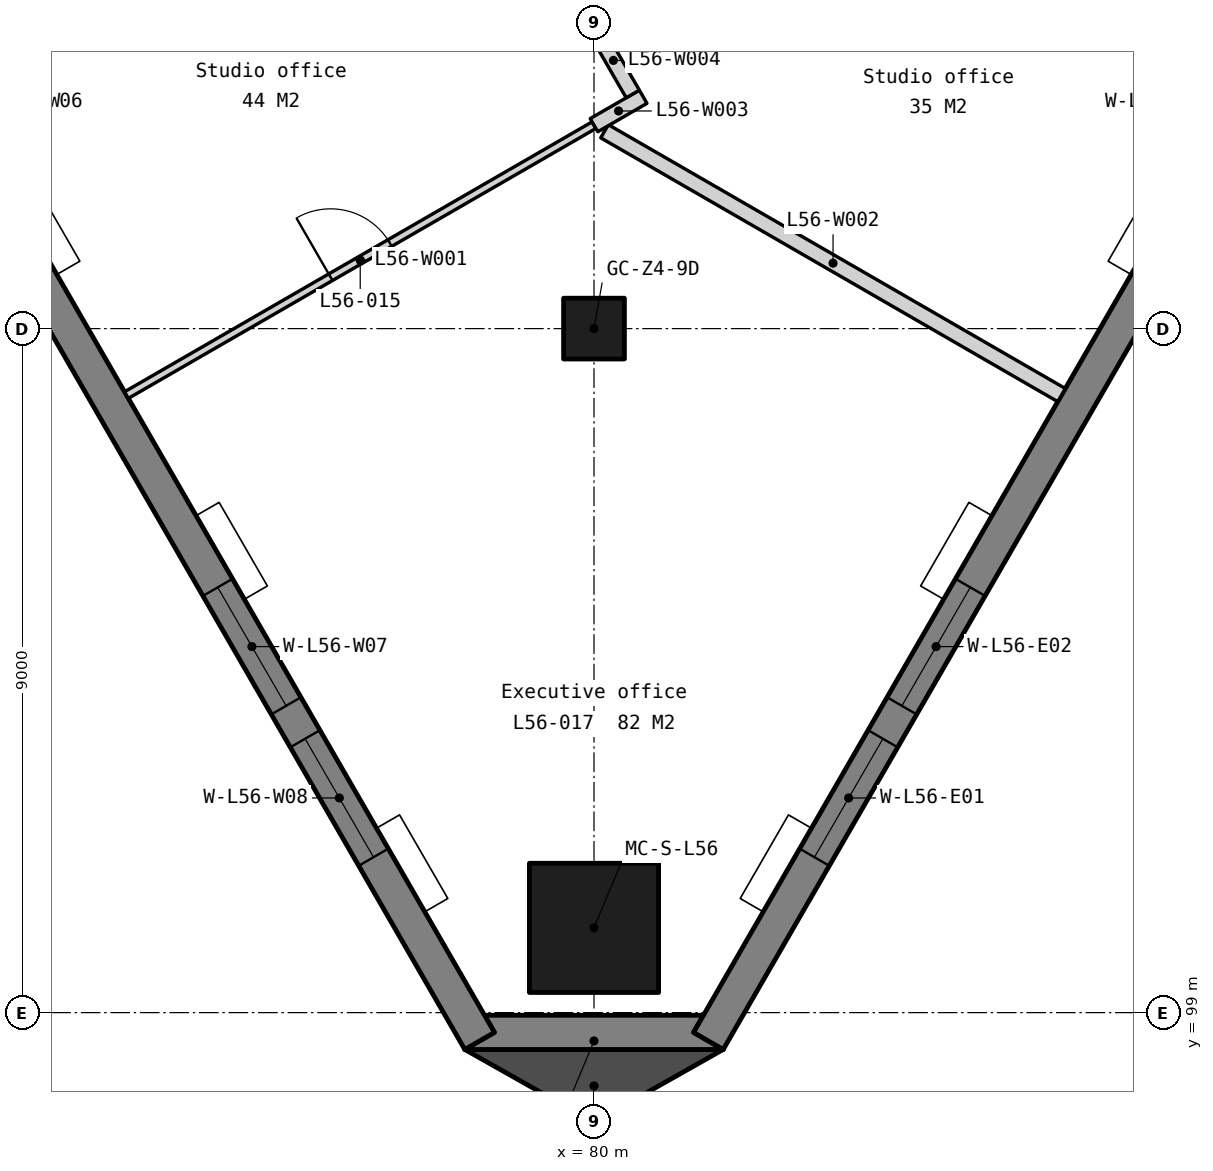
"""IFC4 building model, lengths in metres.
Left out: names, types, materials, properties, quantities, classifications, styles, units other than length and angle.
Written with IfcOpenShell. Run it as: python <this file> out.ifc"""

import sys

from ifc_helpers import new_model, si_unit, direction, frame, frame_2d, origin, origin_2d, place, context, subcontext, project, spatial, polyline, rectangle, outline, extrude, element, fill, save


model = new_model("IFC4")
c1 = context("Model", 3, precision=1e-05, world=origin(), true_north=direction((0.0, 1.0)))
c2 = subcontext(c1, "Body", "Model", "MODEL_VIEW")
j1 = project(units=[si_unit("LENGTHUNIT", "METRE"), si_unit("PLANEANGLEUNIT", "RADIAN")], contexts=[c1])
p1 = place(None, origin())
s1 = spatial("IfcSite", under=j1, at=p1, CompositionType="ELEMENT")
p2 = place(p1, origin())
s2 = spatial("IfcBuilding", under=s1, at=p2, CompositionType="ELEMENT")
p3 = place(p2, frame((0.0, 0.0, 223.1)))
s3 = spatial("IfcBuildingStorey", under=s2, at=p3, CompositionType="ELEMENT", Elevation=223.1)
p4 = place(p3, frame((80.0, 108.0, 0.0), z_axis=(0.0, 0.0, 1.0), x_axis=(1.0, 0.0, 0.0)))
e1 = element("IfcColumn", 1, at=p4, inside=s3, PredefinedType="COLUMN", context=c2, shape_type="SweptSolid", body=[
    extrude(rectangle(XDim=0.8, YDim=0.8, at=origin_2d()), origin(), (0.0, 0.0, 1.0), 3.9),
])
p5 = place(p3, frame((80.0, 100.115, 0.0), z_axis=(0.0, 0.0, 1.0), x_axis=(1.0, 0.0, 0.0)))
e2 = element("IfcColumn", 2, at=p5, inside=s3, PredefinedType="COLUMN", context=c2, shape_type="SweptSolid", body=[
    extrude(rectangle(XDim=1.7, YDim=1.7, at=origin_2d()), origin(), (0.0, 0.0, 1.0), 3.9),
])
p6 = place(p3, frame((0.0, 0.0, -0.15)))
e3 = element("IfcWall", 3, at=p6, inside=s3, PredefinedType="SOLIDWALL", context=c2, shape_type="SweptSolid", body=[
    extrude(outline(polyline([(78.3, 98.515), (78.69, 98.74), (78.56, 98.965), (81.44, 98.965), (81.31, 98.74), (81.7, 98.515), (78.3, 98.515)])), origin(), (0.0, 0.0, 1.0), 3.75),
])
p7 = place(p3, frame((59.13, 132.168, -0.15), z_axis=(0.0, 0.0, 1.0), x_axis=(0.500002199942, -0.866024133644, 0.0)))
e4 = element("IfcWall", 4, at=p7, inside=s3, PredefinedType="SOLIDWALL", context=c2, shape_type="SweptSolid", body=[
    extrude(outline(polyline([(38.729, 0.0), (38.729, 3.75), (0.0, 3.75), (0.0, 0.0), (38.729, 0.0)])), frame((0.0, 0.225, 0.0), z_axis=(0.0, -1.0, 0.0), x_axis=(1.0, 0.0, 0.0)), (0.0, 0.0, 1.0), 0.45),
])
p8 = place(p7, frame((2.791, 0.0, 0.95)))
e5 = element("IfcOpeningElement", 5, at=p8, cuts=e4, PredefinedType="OPENING", context=c2, shape_type="SweptSolid", body=[
    extrude(rectangle(XDim=1.8, YDim=2.2, at=frame_2d((0.9, 1.1))), frame((0.0, 0.235, 0.0), z_axis=(0.0, -1.0, 0.0), x_axis=(1.0, 0.0, 0.0)), (0.0, 0.0, 1.0), 0.47),
])
p9 = place(p7, frame((5.091, 0.0, 0.95)))
e6 = element("IfcOpeningElement", 6, at=p9, cuts=e4, PredefinedType="OPENING", context=c2, shape_type="SweptSolid", body=[
    extrude(rectangle(XDim=1.8, YDim=2.2, at=frame_2d((0.9, 1.1))), frame((0.0, 0.235, 0.0), z_axis=(0.0, -1.0, 0.0), x_axis=(1.0, 0.0, 0.0)), (0.0, 0.0, 1.0), 0.47),
])
p10 = place(p7, frame((12.473, 0.0, 0.95)))
e7 = element("IfcOpeningElement", 7, at=p10, cuts=e4, PredefinedType="OPENING", context=c2, shape_type="SweptSolid", body=[
    extrude(rectangle(XDim=1.8, YDim=2.2, at=frame_2d((0.9, 1.1))), frame((0.0, 0.235, 0.0), z_axis=(0.0, -1.0, 0.0), x_axis=(1.0, 0.0, 0.0)), (0.0, 0.0, 1.0), 0.47),
])
p11 = place(p7, frame((14.773, 0.0, 0.95)))
e8 = element("IfcOpeningElement", 8, at=p11, cuts=e4, PredefinedType="OPENING", context=c2, shape_type="SweptSolid", body=[
    extrude(rectangle(XDim=1.8, YDim=2.2, at=frame_2d((0.9, 1.1))), frame((0.0, 0.235, 0.0), z_axis=(0.0, -1.0, 0.0), x_axis=(1.0, 0.0, 0.0)), (0.0, 0.0, 1.0), 0.47),
])
p12 = place(p7, frame((22.156, 0.0, 0.95)))
e9 = element("IfcOpeningElement", 9, at=p12, cuts=e4, PredefinedType="OPENING", context=c2, shape_type="SweptSolid", body=[
    extrude(rectangle(XDim=1.8, YDim=2.2, at=frame_2d((0.9, 1.1))), frame((0.0, 0.235, 0.0), z_axis=(0.0, -1.0, 0.0), x_axis=(1.0, 0.0, 0.0)), (0.0, 0.0, 1.0), 0.47),
])
p13 = place(p7, frame((24.456, 0.0, 0.95)))
e10 = element("IfcOpeningElement", 10, at=p13, cuts=e4, PredefinedType="OPENING", context=c2, shape_type="SweptSolid", body=[
    extrude(rectangle(XDim=1.8, YDim=2.2, at=frame_2d((0.9, 1.1))), frame((0.0, 0.235, 0.0), z_axis=(0.0, -1.0, 0.0), x_axis=(1.0, 0.0, 0.0)), (0.0, 0.0, 1.0), 0.47),
])
p14 = place(p7, frame((31.838, 0.0, 0.95)))
e11 = element("IfcOpeningElement", 11, at=p14, cuts=e4, PredefinedType="OPENING", context=c2, shape_type="SweptSolid", body=[
    extrude(rectangle(XDim=1.8, YDim=2.2, at=frame_2d((0.9, 1.1))), frame((0.0, 0.235, 0.0), z_axis=(0.0, -1.0, 0.0), x_axis=(1.0, 0.0, 0.0)), (0.0, 0.0, 1.0), 0.47),
])
p15 = place(p7, frame((34.138, 0.0, 0.95)))
e12 = element("IfcOpeningElement", 12, at=p15, cuts=e4, PredefinedType="OPENING", context=c2, shape_type="SweptSolid", body=[
    extrude(rectangle(XDim=1.8, YDim=2.2, at=frame_2d((0.9, 1.1))), frame((0.0, 0.235, 0.0), z_axis=(0.0, -1.0, 0.0), x_axis=(1.0, 0.0, 0.0)), (0.0, 0.0, 1.0), 0.47),
])
p16 = place(p3, frame((81.505, 98.627, -0.15), z_axis=(0.0, 0.0, 1.0), x_axis=(0.500002199942, 0.866024133644, 0.0)))
e13 = element("IfcWall", 13, at=p16, inside=s3, PredefinedType="SOLIDWALL", context=c2, shape_type="SweptSolid", body=[
    extrude(outline(polyline([(38.729, 0.0), (38.729, 3.75), (0.0, 3.75), (0.0, 0.0), (38.729, 0.0)])), frame((0.0, 0.225, 0.0), z_axis=(0.0, -1.0, 0.0), x_axis=(1.0, 0.0, 0.0)), (0.0, 0.0, 1.0), 0.45),
])
p17 = place(p16, frame((2.791, 0.0, 0.95)))
e14 = element("IfcOpeningElement", 14, at=p17, cuts=e13, PredefinedType="OPENING", context=c2, shape_type="SweptSolid", body=[
    extrude(rectangle(XDim=1.8, YDim=2.2, at=frame_2d((0.9, 1.1))), frame((0.0, 0.235, 0.0), z_axis=(0.0, -1.0, 0.0), x_axis=(1.0, 0.0, 0.0)), (0.0, 0.0, 1.0), 0.47),
])
p18 = place(p16, frame((5.091, 0.0, 0.95)))
e15 = element("IfcOpeningElement", 15, at=p18, cuts=e13, PredefinedType="OPENING", context=c2, shape_type="SweptSolid", body=[
    extrude(rectangle(XDim=1.8, YDim=2.2, at=frame_2d((0.9, 1.1))), frame((0.0, 0.235, 0.0), z_axis=(0.0, -1.0, 0.0), x_axis=(1.0, 0.0, 0.0)), (0.0, 0.0, 1.0), 0.47),
])
p19 = place(p16, frame((12.473, 0.0, 0.95)))
e16 = element("IfcOpeningElement", 16, at=p19, cuts=e13, PredefinedType="OPENING", context=c2, shape_type="SweptSolid", body=[
    extrude(rectangle(XDim=1.8, YDim=2.2, at=frame_2d((0.9, 1.1))), frame((0.0, 0.235, 0.0), z_axis=(0.0, -1.0, 0.0), x_axis=(1.0, 0.0, 0.0)), (0.0, 0.0, 1.0), 0.47),
])
p20 = place(p16, frame((14.773, 0.0, 0.95)))
e17 = element("IfcOpeningElement", 17, at=p20, cuts=e13, PredefinedType="OPENING", context=c2, shape_type="SweptSolid", body=[
    extrude(rectangle(XDim=1.8, YDim=2.2, at=frame_2d((0.9, 1.1))), frame((0.0, 0.235, 0.0), z_axis=(0.0, -1.0, 0.0), x_axis=(1.0, 0.0, 0.0)), (0.0, 0.0, 1.0), 0.47),
])
p21 = place(p16, frame((22.156, 0.0, 0.95)))
e18 = element("IfcOpeningElement", 18, at=p21, cuts=e13, PredefinedType="OPENING", context=c2, shape_type="SweptSolid", body=[
    extrude(rectangle(XDim=1.8, YDim=2.2, at=frame_2d((0.9, 1.1))), frame((0.0, 0.235, 0.0), z_axis=(0.0, -1.0, 0.0), x_axis=(1.0, 0.0, 0.0)), (0.0, 0.0, 1.0), 0.47),
])
p22 = place(p16, frame((24.456, 0.0, 0.95)))
e19 = element("IfcOpeningElement", 19, at=p22, cuts=e13, PredefinedType="OPENING", context=c2, shape_type="SweptSolid", body=[
    extrude(rectangle(XDim=1.8, YDim=2.2, at=frame_2d((0.9, 1.1))), frame((0.0, 0.235, 0.0), z_axis=(0.0, -1.0, 0.0), x_axis=(1.0, 0.0, 0.0)), (0.0, 0.0, 1.0), 0.47),
])
p23 = place(p16, frame((31.838, 0.0, 0.95)))
e20 = element("IfcOpeningElement", 20, at=p23, cuts=e13, PredefinedType="OPENING", context=c2, shape_type="SweptSolid", body=[
    extrude(rectangle(XDim=1.8, YDim=2.2, at=frame_2d((0.9, 1.1))), frame((0.0, 0.235, 0.0), z_axis=(0.0, -1.0, 0.0), x_axis=(1.0, 0.0, 0.0)), (0.0, 0.0, 1.0), 0.47),
])
p24 = place(p16, frame((34.138, 0.0, 0.95)))
e21 = element("IfcOpeningElement", 21, at=p24, cuts=e13, PredefinedType="OPENING", context=c2, shape_type="SweptSolid", body=[
    extrude(rectangle(XDim=1.8, YDim=2.2, at=frame_2d((0.9, 1.1))), frame((0.0, 0.235, 0.0), z_axis=(0.0, -1.0, 0.0), x_axis=(1.0, 0.0, 0.0)), (0.0, 0.0, 1.0), 0.47),
])
p25 = place(p3, frame((0.0, 0.0, -0.15)))
e22 = element("IfcWall", 22, at=p25, inside=s3, PredefinedType="SOLIDWALL", context=c2, shape_type="SweptSolid", body=[
    extrude(outline(polyline([(78.3, 98.515), (80.0, 97.555), (81.7, 98.515), (78.3, 98.515)])), origin(), (0.0, 0.0, 1.0), 3.75),
])
p26 = place(p3, frame((73.849, 107.125, 0.0), z_axis=(0.0, 0.0, 1.0), x_axis=(0.866024174161, 0.500002129764, 0.0)))
e23 = element("IfcWall", 23, at=p26, inside=s3, PredefinedType="PARTITIONING", context=c2, shape_type="SweptSolid", body=[
    extrude(rectangle(XDim=7.103, YDim=0.1, at=frame_2d((3.552, 0.0))), origin(), (0.0, 0.0, 1.0), 3.6),
])
p27 = place(p26, frame((3.102, 0.0, 0.0)))
e24 = element("IfcOpeningElement", 24, at=p27, cuts=e23, PredefinedType="OPENING", context=c2, shape_type="SweptSolid", body=[
    extrude(rectangle(XDim=0.9, YDim=2.1, at=frame_2d((0.45, 1.05))), frame((0.0, 0.06, 0.0), z_axis=(0.0, -1.0, 0.0), x_axis=(1.0, 0.0, 0.0)), (0.0, 0.0, 1.0), 0.12),
])
p28 = place(p3, frame((80.139, 110.597, 0.0), z_axis=(0.0, 0.0, 1.0), x_axis=(0.866025136247, -0.500000463387, 0.0)))
e25 = element("IfcWall", 25, at=p28, inside=s3, PredefinedType="PARTITIONING", context=c2, shape_type="SweptSolid", body=[
    extrude(rectangle(XDim=6.943, YDim=0.2, at=frame_2d((3.471, 0.0))), origin(), (0.0, 0.0, 1.0), 3.6),
])
p29 = place(p3, frame((80.0, 110.677, 0.0), z_axis=(0.0, 0.0, 1.0), x_axis=(0.866163819127, 0.499760180923, 0.0)))
e26 = element("IfcWall", 26, at=p29, inside=s3, PredefinedType="PARTITIONING", context=c2, shape_type="SweptSolid", body=[
    extrude(rectangle(XDim=0.747, YDim=0.2, at=frame_2d((0.374, 0.0))), origin(), (0.0, 0.0, 1.0), 3.6),
])
p30 = place(p3, frame((80.0, 111.97, 0.0), z_axis=(0.0, 0.0, 1.0), x_axis=(0.499998569178, -0.866026229868, 0.0)))
e27 = element("IfcWall", 27, at=p30, inside=s3, PredefinedType="PARTITIONING", context=c2, shape_type="SweptSolid", body=[
    extrude(rectangle(XDim=1.021, YDim=0.2, at=frame_2d((0.51, 0.0))), origin(), (0.0, 0.0, 1.0), 3.6),
])
p31 = place(p3, frame((81.934, 115.15, 0.0), z_axis=(0.0, 0.0, 1.0), x_axis=(0.866027525232, -0.499996325527, 0.0)))
e28 = element("IfcWall", 28, at=p31, inside=s3, PredefinedType="PARTITIONING", context=c2, shape_type="SweptSolid", body=[
    extrude(rectangle(XDim=7.665, YDim=0.2, at=frame_2d((3.833, 0.0))), origin(), (0.0, 0.0, 1.0), 3.6),
])
p32 = place(p14, origin())
e29 = element("IfcWindow", 29, at=p32, inside=s3, PartitioningType="SINGLE_PANEL", PredefinedType="WINDOW", context=c2, shape_type="SweptSolid", body=[
    extrude(rectangle(XDim=1.8, YDim=2.2, at=frame_2d((0.9, 1.1))), frame((0.0, 0.03, 0.0), z_axis=(0.0, -1.0, 0.0), x_axis=(1.0, 0.0, 0.0)), (0.0, 0.0, 1.0), 0.06),
])
fill(e11, e29)
p33 = place(p15, origin())
e30 = element("IfcWindow", 30, at=p33, inside=s3, PartitioningType="SINGLE_PANEL", PredefinedType="WINDOW", context=c2, shape_type="SweptSolid", body=[
    extrude(rectangle(XDim=1.8, YDim=2.2, at=frame_2d((0.9, 1.1))), frame((0.0, 0.03, 0.0), z_axis=(0.0, -1.0, 0.0), x_axis=(1.0, 0.0, 0.0)), (0.0, 0.0, 1.0), 0.06),
])
fill(e12, e30)
p34 = place(p17, origin())
e31 = element("IfcWindow", 31, at=p34, inside=s3, PartitioningType="SINGLE_PANEL", PredefinedType="WINDOW", context=c2, shape_type="SweptSolid", body=[
    extrude(rectangle(XDim=1.8, YDim=2.2, at=frame_2d((0.9, 1.1))), frame((0.0, 0.03, 0.0), z_axis=(0.0, -1.0, 0.0), x_axis=(1.0, 0.0, 0.0)), (0.0, 0.0, 1.0), 0.06),
])
fill(e14, e31)
p35 = place(p18, origin())
e32 = element("IfcWindow", 32, at=p35, inside=s3, PartitioningType="SINGLE_PANEL", PredefinedType="WINDOW", context=c2, shape_type="SweptSolid", body=[
    extrude(rectangle(XDim=1.8, YDim=2.2, at=frame_2d((0.9, 1.1))), frame((0.0, 0.03, 0.0), z_axis=(0.0, -1.0, 0.0), x_axis=(1.0, 0.0, 0.0)), (0.0, 0.0, 1.0), 0.06),
])
fill(e15, e32)
p36 = place(p27, origin())
e33 = element("IfcDoor", 33, at=p36, inside=s3, OperationType="SINGLE_SWING_LEFT", PredefinedType="DOOR", context=c2, shape_type="SweptSolid", body=[
    extrude(rectangle(XDim=0.9, YDim=2.1, at=frame_2d((0.45, 1.05))), frame((0.0, 0.025, 0.0), z_axis=(0.0, -1.0, 0.0), x_axis=(1.0, 0.0, 0.0)), (0.0, 0.0, 1.0), 0.05),
])
fill(e24, e33)
save(model, sys.argv[1])
